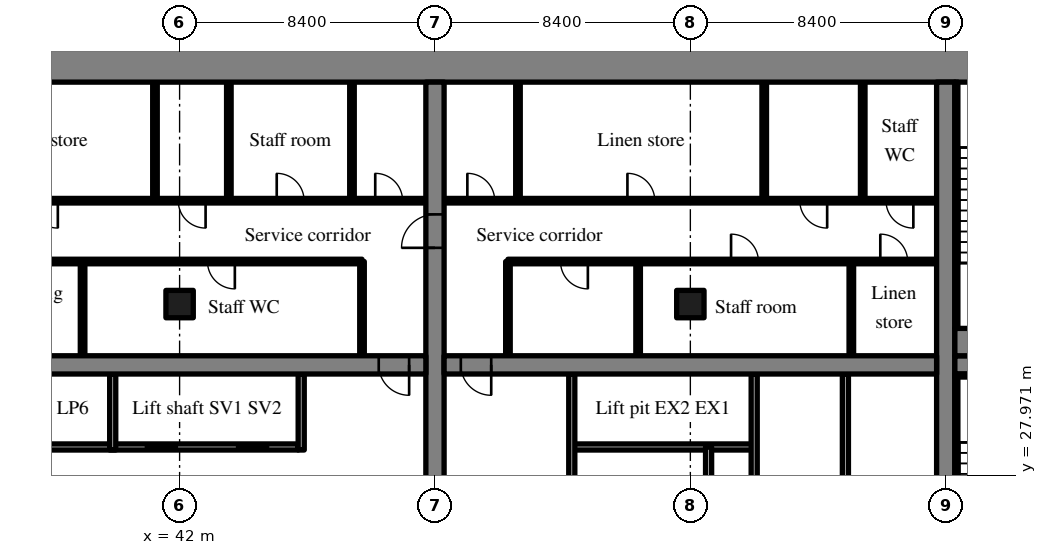
"""IFC4 building model, lengths in metres.
Left out: names, types, materials, properties, quantities, classifications, styles, units other than length and angle.
Written with IfcOpenShell. Run it as: python <this file> out.ifc"""

import sys

from ifc_helpers import new_model, si_unit, direction, frame, frame_2d, origin, origin_2d, place, context, subcontext, project, spatial, rectangle, extrude, source, transform, mapped, element, fill, save


model = new_model("IFC4")
c1 = context("Model", 3, precision=1e-05, world=origin(), true_north=direction((0.0, 1.0)))
c2 = subcontext(c1, "Body", "Model", "MODEL_VIEW")
j1 = project(units=[si_unit("LENGTHUNIT", "METRE"), si_unit("PLANEANGLEUNIT", "RADIAN")], contexts=[c1])
p1 = place(None, origin())
s1 = spatial("IfcSite", under=j1, at=p1, CompositionType="ELEMENT")
p2 = place(p1, origin())
s2 = spatial("IfcBuilding", under=s1, at=p2, CompositionType="ELEMENT")
p3 = place(p2, frame((0.0, 0.0, -4.5)))
s3 = spatial("IfcBuildingStorey", under=s2, at=p3, CompositionType="ELEMENT", Elevation=-4.5)
m1 = source(origin(), c2, "Body", "SweptSolid", [
    extrude(rectangle(XDim=50.4, YDim=1.1, at=frame_2d((25.2, 0.0))), origin(), (0.0, 0.0, 1.0), 4.22),
])
p4 = place(p3, frame((25.2, 41.45, 0.0), z_axis=(0.0, 0.0, 1.0), x_axis=(1.0, 0.0, 0.0)))
e1 = element("IfcWall", 1, at=p4, inside=s3, PredefinedType="SHEAR", context=c2, shape_type="MappedRepresentation", body=[
    mapped(m1, transform((0.0, 0.0, 0.0), scale=1.0)),
])
m2 = source(origin(), c2, "Body", "SweptSolid", [
    extrude(rectangle(XDim=17.8, YDim=0.6, at=frame_2d((8.9, 0.0))), origin(), (0.0, 0.0, 1.0), 4.22),
])
p5 = place(p3, frame((50.4, 23.1, 0.0), z_axis=(0.0, 0.0, 1.0), x_axis=(0.0, 1.0, 0.0)))
e2 = element("IfcWall", 2, at=p5, inside=s3, PredefinedType="SHEAR", context=c2, shape_type="MappedRepresentation", body=[
    mapped(m2, transform((0.0, 0.0, 0.0), scale=1.0)),
])
m3 = source(origin(), c2, "Body", "SweptSolid", [
    extrude(rectangle(XDim=1.1, YDim=2.1, at=frame_2d((0.55, 1.05))), frame((0.0, 0.31, 0.0), z_axis=(0.0, -1.0, 0.0), x_axis=(1.0, 0.0, 0.0)), (0.0, 0.0, 1.0), 0.62),
])
p6 = place(p5, frame((12.35, 0.0, 0.0)))
e3 = element("IfcOpeningElement", 3, at=p6, cuts=e2, PredefinedType="OPENING", context=c2, shape_type="MappedRepresentation", body=[
    mapped(m3, transform((0.0, 0.0, 0.0), scale=1.0)),
])
p7 = place(p3, frame((67.2, 23.1, 0.0), z_axis=(0.0, 0.0, 1.0), x_axis=(0.0, 1.0, 0.0)))
e4 = element("IfcWall", 4, at=p7, inside=s3, PredefinedType="SHEAR", context=c2, shape_type="MappedRepresentation", body=[
    mapped(m2, transform((0.0, 0.0, 0.0), scale=1.0)),
])
m4 = source(origin(), c2, "Body", "SweptSolid", [
    extrude(rectangle(XDim=16.2, YDim=0.6, at=frame_2d((8.1, 0.0))), origin(), (0.0, 0.0, 1.0), 4.22),
])
p8 = place(p3, frame((33.9, 31.6, 0.0), z_axis=(0.0, 0.0, 1.0), x_axis=(1.0, 0.0, 0.0)))
e5 = element("IfcWall", 5, at=p8, inside=s3, PredefinedType="SHEAR", context=c2, shape_type="MappedRepresentation", body=[
    mapped(m4, transform((0.0, 0.0, 0.0), scale=1.0)),
])
m5 = source(origin(), c2, "Body", "SweptSolid", [
    extrude(rectangle(XDim=1.0, YDim=2.1, at=frame_2d((0.5, 1.05))), frame((0.0, 0.31, 0.0), z_axis=(0.0, -1.0, 0.0), x_axis=(1.0, 0.0, 0.0)), (0.0, 0.0, 1.0), 0.62),
])
p9 = place(p8, frame((14.65, 0.0, 0.0)))
e6 = element("IfcOpeningElement", 6, at=p9, cuts=e5, PredefinedType="OPENING", context=c2, shape_type="MappedRepresentation", body=[
    mapped(m5, transform((0.0, 0.0, 0.0), scale=1.0)),
])
m6 = source(origin(), c2, "Body", "SweptSolid", [
    extrude(rectangle(XDim=16.2, YDim=0.6, at=frame_2d((8.1, 0.0))), origin(), (0.0, 0.0, 1.0), 4.22),
])
p10 = place(p3, frame((50.7, 31.6, 0.0), z_axis=(0.0, 0.0, 1.0), x_axis=(1.0, 0.0, 0.0)))
e7 = element("IfcWall", 7, at=p10, inside=s3, PredefinedType="SHEAR", context=c2, shape_type="MappedRepresentation", body=[
    mapped(m6, transform((0.0, 0.0, 0.0), scale=1.0)),
])
p11 = place(p10, frame((0.55, 0.0, 0.0)))
e8 = element("IfcOpeningElement", 8, at=p11, cuts=e7, PredefinedType="OPENING", context=c2, shape_type="MappedRepresentation", body=[
    mapped(m5, transform((0.0, 0.0, 0.0), scale=1.0)),
])
m7 = source(origin(), c2, "Body", "SweptSolid", [
    extrude(rectangle(XDim=7.0, YDim=0.6, at=frame_2d((3.5, 0.0))), origin(), (0.0, 0.0, 1.0), 4.22),
])
p12 = place(p3, frame((67.5, 31.6, 0.0), z_axis=(0.0, 0.0, 1.0), x_axis=(1.0, 0.0, 0.0)))
e9 = element("IfcWall", 9, at=p12, inside=s3, PredefinedType="SHEAR", context=c2, shape_type="MappedRepresentation", body=[
    mapped(m7, transform((0.0, 0.0, 0.0), scale=1.0)),
])
p13 = place(p12, frame((5.425, 0.0, 0.0)))
e10 = element("IfcOpeningElement", 10, at=p13, cuts=e9, PredefinedType="OPENING", context=c2, shape_type="MappedRepresentation", body=[
    mapped(m3, transform((0.0, 0.0, 0.0), scale=1.0)),
])
m8 = source(origin(), c2, "Body", "SweptSolid", [
    extrude(rectangle(XDim=0.9, YDim=0.9, at=origin_2d()), origin(), (0.0, 0.0, 1.0), 4.22),
])
for number, where, z_axis, x_axis in (
    (11, (42.0, 33.6, 0.0), (0.0, 0.0, 1.0), (1.0, 0.0, 0.0)),
    (12, (58.8, 33.6, 0.0), (0.0, 0.0, 1.0), (1.0, 0.0, 0.0)),
):
    element("IfcColumn", number, at=place(p3, frame(where, z_axis=z_axis, x_axis=x_axis)), inside=s3, PredefinedType="COLUMN", context=c2, shape_type="MappedRepresentation", body=[
        mapped(m8, transform((0.0, 0.0, 0.0), scale=1.0)),
    ])
m9 = source(origin(), c2, "Body", "SweptSolid", [
    extrude(rectangle(XDim=12.0, YDim=0.2, at=frame_2d((6.0, 0.0))), origin(), (0.0, 0.0, 1.0), 4.22),
])
p14 = place(p3, frame((33.9, 28.9, 0.0), z_axis=(0.0, 0.0, 1.0), x_axis=(1.0, 0.0, 0.0)))
e13 = element("IfcWall", 13, at=p14, inside=s3, PredefinedType="SOLIDWALL", context=c2, shape_type="MappedRepresentation", body=[
    mapped(m9, transform((0.0, 0.0, 0.0), scale=1.0)),
])
m10 = source(origin(), c2, "Body", "SweptSolid", [
    extrude(rectangle(XDim=1.1, YDim=2.1, at=frame_2d((0.55, 1.05))), frame((0.0, 0.11, 0.0), z_axis=(0.0, -1.0, 0.0), x_axis=(1.0, 0.0, 0.0)), (0.0, 0.0, 1.0), 0.22),
])
p15 = place(p14, frame((6.95, 0.0, 0.0)))
e14 = element("IfcOpeningElement", 14, at=p15, cuts=e13, PredefinedType="OPENING", context=c2, shape_type="MappedRepresentation", body=[
    mapped(m10, transform((0.0, 0.0, 0.0), scale=1.0)),
])
p16 = place(p14, frame((9.95, 0.0, 0.0)))
e15 = element("IfcOpeningElement", 15, at=p16, cuts=e13, PredefinedType="OPENING", context=c2, shape_type="MappedRepresentation", body=[
    mapped(m10, transform((0.0, 0.0, 0.0), scale=1.0)),
])
m11 = source(origin(), c2, "Body", "SweptSolid", [
    extrude(rectangle(XDim=2.5, YDim=0.2, at=frame_2d((1.25, 0.0))), origin(), (0.0, 0.0, 1.0), 4.22),
])
for number, where, z_axis, x_axis in (
    (16, (46.0, 28.8, 0.0), (0.0, 0.0, 1.0), (0.0, 1.0, 0.0)),
    (17, (39.8, 28.8, 0.0), (0.0, 0.0, 1.0), (0.0, 1.0, 0.0)),
):
    element("IfcWall", number, at=place(p3, frame(where, z_axis=z_axis, x_axis=x_axis)), inside=s3, PredefinedType="SOLIDWALL", context=c2, shape_type="MappedRepresentation", body=[
        mapped(m11, transform((0.0, 0.0, 0.0), scale=1.0)),
    ])
m12 = source(origin(), c2, "Body", "SweptSolid", [
    extrude(rectangle(XDim=3.1, YDim=0.15, at=frame_2d((1.55, 0.0))), origin(), (0.0, 0.0, 1.0), 4.22),
])
p17 = place(p3, frame((48.0, 31.9, 0.0), z_axis=(0.0, 0.0, 1.0), x_axis=(0.0, 1.0, 0.0)))
e18 = element("IfcWall", 18, at=p17, inside=s3, PredefinedType="PARTITIONING", context=c2, shape_type="MappedRepresentation", body=[
    mapped(m12, transform((0.0, 0.0, 0.0), scale=1.0)),
])
m13 = source(origin(), c2, "Body", "SweptSolid", [
    extrude(rectangle(XDim=14.1, YDim=0.15, at=frame_2d((7.05, 0.0))), origin(), (0.0, 0.0, 1.0), 4.22),
])
p18 = place(p3, frame((33.9, 35.0, 0.0), z_axis=(0.0, 0.0, 1.0), x_axis=(1.0, 0.0, 0.0)))
e19 = element("IfcWall", 19, at=p18, inside=s3, PredefinedType="PARTITIONING", context=c2, shape_type="MappedRepresentation", body=[
    mapped(m13, transform((0.0, 0.0, 0.0), scale=1.0)),
])
m14 = source(origin(), c2, "Body", "SweptSolid", [
    extrude(rectangle(XDim=0.9, YDim=2.1, at=frame_2d((0.45, 1.05))), frame((0.0, 0.085, 0.0), z_axis=(0.0, -1.0, 0.0), x_axis=(1.0, 0.0, 0.0)), (0.0, 0.0, 1.0), 0.17),
])
p19 = place(p18, frame((2.004, 0.0, 0.0)))
e20 = element("IfcOpeningElement", 20, at=p19, cuts=e19, PredefinedType="OPENING", context=c2, shape_type="MappedRepresentation", body=[
    mapped(m14, transform((0.0, 0.0, 0.0), scale=1.0)),
])
p20 = place(p18, frame((9.017, 0.0, 0.0)))
e21 = element("IfcOpeningElement", 21, at=p20, cuts=e19, PredefinedType="OPENING", context=c2, shape_type="MappedRepresentation", body=[
    mapped(m14, transform((0.0, 0.0, 0.0), scale=1.0)),
])
m15 = source(origin(), c2, "Body", "SweptSolid", [
    extrude(rectangle(XDim=16.2, YDim=0.15, at=frame_2d((8.1, 0.0))), origin(), (0.0, 0.0, 1.0), 4.22),
])
p21 = place(p3, frame((33.9, 37.0, 0.0), z_axis=(0.0, 0.0, 1.0), x_axis=(1.0, 0.0, 0.0)))
e22 = element("IfcWall", 22, at=p21, inside=s3, PredefinedType="PARTITIONING", context=c2, shape_type="MappedRepresentation", body=[
    mapped(m15, transform((0.0, 0.0, 0.0), scale=1.0)),
])
p22 = place(p21, frame((3.195, 0.0, 0.0)))
e23 = element("IfcOpeningElement", 23, at=p22, cuts=e22, PredefinedType="OPENING", context=c2, shape_type="MappedRepresentation", body=[
    mapped(m14, transform((0.0, 0.0, 0.0), scale=1.0)),
])
p23 = place(p21, frame((8.055, 0.0, 0.0)))
e24 = element("IfcOpeningElement", 24, at=p23, cuts=e22, PredefinedType="OPENING", context=c2, shape_type="MappedRepresentation", body=[
    mapped(m14, transform((0.0, 0.0, 0.0), scale=1.0)),
])
p24 = place(p21, frame((11.295, 0.0, 0.0)))
e25 = element("IfcOpeningElement", 25, at=p24, cuts=e22, PredefinedType="OPENING", context=c2, shape_type="MappedRepresentation", body=[
    mapped(m14, transform((0.0, 0.0, 0.0), scale=1.0)),
])
p25 = place(p21, frame((14.535, 0.0, 0.0)))
e26 = element("IfcOpeningElement", 26, at=p25, cuts=e22, PredefinedType="OPENING", context=c2, shape_type="MappedRepresentation", body=[
    mapped(m14, transform((0.0, 0.0, 0.0), scale=1.0)),
])
p26 = place(p3, frame((38.809, 31.9, 0.0), z_axis=(0.0, 0.0, 1.0), x_axis=(0.0, 1.0, 0.0)))
e27 = element("IfcWall", 27, at=p26, inside=s3, PredefinedType="PARTITIONING", context=c2, shape_type="MappedRepresentation", body=[
    mapped(m12, transform((0.0, 0.0, 0.0), scale=1.0)),
])
m16 = source(origin(), c2, "Body", "SweptSolid", [
    extrude(rectangle(XDim=3.9, YDim=0.15, at=frame_2d((1.95, 0.0))), origin(), (0.0, 0.0, 1.0), 4.22),
])
for number, where, z_axis, x_axis in (
    (28, (41.19, 37.0, 0.0), (0.0, 0.0, 1.0), (0.0, 1.0, 0.0)),
    (29, (43.62, 37.0, 0.0), (0.0, 0.0, 1.0), (0.0, 1.0, 0.0)),
    (30, (47.67, 37.0, 0.0), (0.0, 0.0, 1.0), (0.0, 1.0, 0.0)),
):
    element("IfcWall", number, at=place(p3, frame(where, z_axis=z_axis, x_axis=x_axis)), inside=s3, PredefinedType="PARTITIONING", context=c2, shape_type="MappedRepresentation", body=[
        mapped(m16, transform((0.0, 0.0, 0.0), scale=1.0)),
    ])
m17 = source(origin(), c2, "Body", "SweptSolid", [
    extrude(rectangle(XDim=6.0, YDim=0.2, at=frame_2d((3.0, 0.0))), origin(), (0.0, 0.0, 1.0), 4.22),
])
p27 = place(p3, frame((60.9, 28.9, 0.0), z_axis=(0.0, 0.0, 1.0), x_axis=(-1.0, 0.0, 0.0)))
e31 = element("IfcWall", 31, at=p27, inside=s3, PredefinedType="SOLIDWALL", context=c2, shape_type="MappedRepresentation", body=[
    mapped(m17, transform((0.0, 0.0, 0.0), scale=1.0)),
])
m18 = source(origin(), c2, "Body", "SweptSolid", [
    extrude(rectangle(XDim=8.2, YDim=0.2, at=frame_2d((4.1, 0.0))), origin(), (0.0, 0.0, 1.0), 4.22),
])
for number, where, z_axis, x_axis in (
    (32, (54.9, 23.1, 0.0), (0.0, 0.0, 1.0), (0.0, 1.0, 0.0)),
    (33, (60.9, 23.1, 0.0), (0.0, 0.0, 1.0), (0.0, 1.0, 0.0)),
):
    element("IfcWall", number, at=place(p3, frame(where, z_axis=z_axis, x_axis=x_axis)), inside=s3, PredefinedType="PARTITIONING", context=c2, shape_type="MappedRepresentation", body=[
        mapped(m18, transform((0.0, 0.0, 0.0), scale=1.0)),
    ])
m19 = source(origin(), c2, "Body", "SweptSolid", [
    extrude(rectangle(XDim=5.8, YDim=0.2, at=frame_2d((2.9, 0.0))), origin(), (0.0, 0.0, 1.0), 4.22),
])
p28 = place(p3, frame((59.4, 23.1, 0.0), z_axis=(0.0, 0.0, 1.0), x_axis=(0.0, 1.0, 0.0)))
e34 = element("IfcWall", 34, at=p28, inside=s3, PredefinedType="PARTITIONING", context=c2, shape_type="MappedRepresentation", body=[
    mapped(m19, transform((0.0, 0.0, 0.0), scale=1.0)),
])
p29 = place(p3, frame((63.9, 23.1, 0.0), z_axis=(0.0, 0.0, 1.0), x_axis=(0.0, 1.0, 0.0)))
e35 = element("IfcWall", 35, at=p29, inside=s3, PredefinedType="PARTITIONING", context=c2, shape_type="MappedRepresentation", body=[
    mapped(m18, transform((0.0, 0.0, 0.0), scale=1.0)),
])
p30 = place(p3, frame((52.8, 31.9, 0.0), z_axis=(0.0, 0.0, 1.0), x_axis=(0.0, 1.0, 0.0)))
e36 = element("IfcWall", 36, at=p30, inside=s3, PredefinedType="PARTITIONING", context=c2, shape_type="MappedRepresentation", body=[
    mapped(m12, transform((0.0, 0.0, 0.0), scale=1.0)),
])
m20 = source(origin(), c2, "Body", "SweptSolid", [
    extrude(rectangle(XDim=14.1, YDim=0.15, at=frame_2d((7.05, 0.0))), origin(), (0.0, 0.0, 1.0), 4.22),
])
p31 = place(p3, frame((66.9, 35.0, 0.0), z_axis=(0.0, 0.0, 1.0), x_axis=(-1.0, 0.0, 0.0)))
e37 = element("IfcWall", 37, at=p31, inside=s3, PredefinedType="PARTITIONING", context=c2, shape_type="MappedRepresentation", body=[
    mapped(m20, transform((0.0, 0.0, 0.0), scale=1.0)),
])
p32 = place(p31, frame((0.952, 0.0, 0.0)))
e38 = element("IfcOpeningElement", 38, at=p32, cuts=e37, PredefinedType="OPENING", context=c2, shape_type="MappedRepresentation", body=[
    mapped(m14, transform((0.0, 0.0, 0.0), scale=1.0)),
])
p33 = place(p31, frame((5.861, 0.0, 0.0)))
e39 = element("IfcOpeningElement", 39, at=p33, cuts=e37, PredefinedType="OPENING", context=c2, shape_type="MappedRepresentation", body=[
    mapped(m14, transform((0.0, 0.0, 0.0), scale=1.0)),
])
p34 = place(p31, frame((11.471, 0.0, 0.0)))
e40 = element("IfcOpeningElement", 40, at=p34, cuts=e37, PredefinedType="OPENING", context=c2, shape_type="MappedRepresentation", body=[
    mapped(m14, transform((0.0, 0.0, 0.0), scale=1.0)),
])
m21 = source(origin(), c2, "Body", "SweptSolid", [
    extrude(rectangle(XDim=16.2, YDim=0.15, at=frame_2d((8.1, 0.0))), origin(), (0.0, 0.0, 1.0), 4.22),
])
p35 = place(p3, frame((66.9, 37.0, 0.0), z_axis=(0.0, 0.0, 1.0), x_axis=(-1.0, 0.0, 0.0)))
e41 = element("IfcWall", 41, at=p35, inside=s3, PredefinedType="PARTITIONING", context=c2, shape_type="MappedRepresentation", body=[
    mapped(m21, transform((0.0, 0.0, 0.0), scale=1.0)),
])
p36 = place(p35, frame((0.765, 0.0, 0.0)))
e42 = element("IfcOpeningElement", 42, at=p36, cuts=e41, PredefinedType="OPENING", context=c2, shape_type="MappedRepresentation", body=[
    mapped(m14, transform((0.0, 0.0, 0.0), scale=1.0)),
])
p37 = place(p35, frame((3.6, 0.0, 0.0)))
e43 = element("IfcOpeningElement", 43, at=p37, cuts=e41, PredefinedType="OPENING", context=c2, shape_type="MappedRepresentation", body=[
    mapped(m14, transform((0.0, 0.0, 0.0), scale=1.0)),
])
p38 = place(p35, frame((9.27, 0.0, 0.0)))
e44 = element("IfcOpeningElement", 44, at=p38, cuts=e41, PredefinedType="OPENING", context=c2, shape_type="MappedRepresentation", body=[
    mapped(m14, transform((0.0, 0.0, 0.0), scale=1.0)),
])
p39 = place(p35, frame((14.535, 0.0, 0.0)))
e45 = element("IfcOpeningElement", 45, at=p39, cuts=e41, PredefinedType="OPENING", context=c2, shape_type="MappedRepresentation", body=[
    mapped(m14, transform((0.0, 0.0, 0.0), scale=1.0)),
])
for number, where, z_axis, x_axis in (
    (46, (64.095, 31.9, 0.0), (0.0, 0.0, 1.0), (0.0, 1.0, 0.0)),
    (47, (57.082, 31.9, 0.0), (0.0, 0.0, 1.0), (0.0, 1.0, 0.0)),
):
    element("IfcWall", number, at=place(p3, frame(where, z_axis=z_axis, x_axis=x_axis)), inside=s3, PredefinedType="PARTITIONING", context=c2, shape_type="MappedRepresentation", body=[
        mapped(m12, transform((0.0, 0.0, 0.0), scale=1.0)),
    ])
for number, where, z_axis, x_axis in (
    (48, (64.47, 37.0, 0.0), (0.0, 0.0, 1.0), (0.0, 1.0, 0.0)),
    (49, (61.23, 37.0, 0.0), (0.0, 0.0, 1.0), (0.0, 1.0, 0.0)),
    (50, (53.13, 37.0, 0.0), (0.0, 0.0, 1.0), (0.0, 1.0, 0.0)),
):
    element("IfcWall", number, at=place(p3, frame(where, z_axis=z_axis, x_axis=x_axis)), inside=s3, PredefinedType="PARTITIONING", context=c2, shape_type="MappedRepresentation", body=[
        mapped(m16, transform((0.0, 0.0, 0.0), scale=1.0)),
    ])
m22 = source(origin(), c2, "Body", "SweptSolid", [
    extrude(rectangle(XDim=4.75, YDim=0.1, at=frame_2d((2.375, 0.0))), origin(), (0.0, 0.0, 1.0), 4.22),
])
p40 = place(p3, frame((67.5, 31.25, 0.0), z_axis=(0.0, 0.0, 1.0), x_axis=(1.0, 0.0, 0.0)))
e51 = element("IfcWall", 51, at=p40, inside=s3, PredefinedType="SOLIDWALL", context=c2, shape_type="MappedRepresentation", body=[
    mapped(m22, transform((0.0, 0.0, 0.0), scale=1.0)),
])
m23 = source(origin(), c2, "Body", "SweptSolid", [
    extrude(rectangle(XDim=8.1, YDim=0.1, at=frame_2d((4.05, 0.0))), origin(), (0.0, 0.0, 1.0), 4.22),
])
p41 = place(p3, frame((67.55, 23.1, 0.0), z_axis=(0.0, 0.0, 1.0), x_axis=(0.0, 1.0, 0.0)))
e52 = element("IfcWall", 52, at=p41, inside=s3, PredefinedType="SOLIDWALL", context=c2, shape_type="MappedRepresentation", body=[
    mapped(m23, transform((0.0, 0.0, 0.0), scale=1.0)),
])
m24 = source(origin(), c2, "Body", "SweptSolid", [
    extrude(rectangle(XDim=4.75, YDim=0.9, at=frame_2d((2.375, 0.0))), origin(), (0.0, 0.0, 1.0), 4.22),
])
p42 = place(p3, frame((67.5, 32.35, 0.0), z_axis=(0.0, 0.0, 1.0), x_axis=(1.0, 0.0, 0.0)))
e53 = element("IfcWall", 53, at=p42, inside=s3, PredefinedType="SOLIDWALL", context=c2, shape_type="MappedRepresentation", body=[
    mapped(m24, transform((0.0, 0.0, 0.0), scale=1.0)),
])
p43 = place(p3, frame((67.55, 32.8, 0.0), z_axis=(0.0, 0.0, 1.0), x_axis=(0.0, 1.0, 0.0)))
e54 = element("IfcWall", 54, at=p43, inside=s3, PredefinedType="SOLIDWALL", context=c2, shape_type="MappedRepresentation", body=[
    mapped(m23, transform((0.0, 0.0, 0.0), scale=1.0)),
])
m25 = source(origin(), c2, "Body", "SweptSolid", [
    extrude(rectangle(XDim=1.0, YDim=2.1, at=frame_2d((0.5, 1.05))), frame((0.0, 0.025, 0.0), z_axis=(0.0, -1.0, 0.0), x_axis=(1.0, 0.0, 0.0)), (0.0, 0.0, 1.0), 0.05),
])
p44 = place(p9, origin())
e55 = element("IfcDoor", 55, at=p44, inside=s3, OperationType="SINGLE_SWING_RIGHT", PredefinedType="DOOR", context=c2, shape_type="MappedRepresentation", body=[
    mapped(m25, transform((0.0, 0.0, 0.0), scale=1.0)),
])
fill(e6, e55)
m26 = source(origin(), c2, "Body", "SweptSolid", [
    extrude(rectangle(XDim=1.1, YDim=2.1, at=frame_2d((0.55, 1.05))), frame((0.0, 0.025, 0.0), z_axis=(0.0, -1.0, 0.0), x_axis=(1.0, 0.0, 0.0)), (0.0, 0.0, 1.0), 0.05),
])
p45 = place(p15, origin())
e56 = element("IfcDoor", 56, at=p45, inside=s3, OperationType="SLIDING_TO_LEFT", PredefinedType="DOOR", context=c2, shape_type="MappedRepresentation", body=[
    mapped(m26, transform((0.0, 0.0, 0.0), scale=1.0)),
])
fill(e14, e56)
p46 = place(p16, origin())
e57 = element("IfcDoor", 57, at=p46, inside=s3, OperationType="SLIDING_TO_RIGHT", PredefinedType="DOOR", context=c2, shape_type="MappedRepresentation", body=[
    mapped(m26, transform((0.0, 0.0, 0.0), scale=1.0)),
])
fill(e15, e57)
m27 = source(origin(), c2, "Body", "SweptSolid", [
    extrude(rectangle(XDim=0.9, YDim=2.1, at=frame_2d((0.45, 1.05))), frame((0.0, 0.025, 0.0), z_axis=(0.0, -1.0, 0.0), x_axis=(1.0, 0.0, 0.0)), (0.0, 0.0, 1.0), 0.05),
])
p47 = place(p20, origin())
e58 = element("IfcDoor", 58, at=p47, inside=s3, OperationType="SINGLE_SWING_RIGHT", PredefinedType="DOOR", context=c2, shape_type="MappedRepresentation", body=[
    mapped(m27, transform((0.0, 0.0, 0.0), scale=1.0)),
])
fill(e21, e58)
p48 = place(p22, origin())
e59 = element("IfcDoor", 59, at=p48, inside=s3, OperationType="SINGLE_SWING_RIGHT", PredefinedType="DOOR", context=c2, shape_type="MappedRepresentation", body=[
    mapped(m27, transform((0.0, 0.0, 0.0), scale=1.0)),
])
fill(e23, e59)
p49 = place(p23, origin())
e60 = element("IfcDoor", 60, at=p49, inside=s3, OperationType="SINGLE_SWING_RIGHT", PredefinedType="DOOR", context=c2, shape_type="MappedRepresentation", body=[
    mapped(m27, transform((0.0, 0.0, 0.0), scale=1.0)),
])
fill(e24, e60)
p50 = place(p24, origin())
e61 = element("IfcDoor", 61, at=p50, inside=s3, OperationType="SINGLE_SWING_LEFT", PredefinedType="DOOR", context=c2, shape_type="MappedRepresentation", body=[
    mapped(m27, transform((0.0, 0.0, 0.0), scale=1.0)),
])
fill(e25, e61)
p51 = place(p25, origin())
e62 = element("IfcDoor", 62, at=p51, inside=s3, OperationType="SINGLE_SWING_LEFT", PredefinedType="DOOR", context=c2, shape_type="MappedRepresentation", body=[
    mapped(m27, transform((0.0, 0.0, 0.0), scale=1.0)),
])
fill(e26, e62)
p52 = place(p11, origin())
e63 = element("IfcDoor", 63, at=p52, inside=s3, OperationType="SINGLE_SWING_RIGHT", PredefinedType="DOOR", context=c2, shape_type="MappedRepresentation", body=[
    mapped(m25, transform((0.0, 0.0, 0.0), scale=1.0)),
])
fill(e8, e63)
p53 = place(p32, origin())
e64 = element("IfcDoor", 64, at=p53, inside=s3, OperationType="SINGLE_SWING_RIGHT", PredefinedType="DOOR", context=c2, shape_type="MappedRepresentation", body=[
    mapped(m27, transform((0.0, 0.0, 0.0), scale=1.0)),
])
fill(e38, e64)
p54 = place(p33, origin())
e65 = element("IfcDoor", 65, at=p54, inside=s3, OperationType="SINGLE_SWING_RIGHT", PredefinedType="DOOR", context=c2, shape_type="MappedRepresentation", body=[
    mapped(m27, transform((0.0, 0.0, 0.0), scale=1.0)),
])
fill(e39, e65)
p55 = place(p34, origin())
e66 = element("IfcDoor", 66, at=p55, inside=s3, OperationType="SINGLE_SWING_LEFT", PredefinedType="DOOR", context=c2, shape_type="MappedRepresentation", body=[
    mapped(m27, transform((0.0, 0.0, 0.0), scale=1.0)),
])
fill(e40, e66)
p56 = place(p36, origin())
e67 = element("IfcDoor", 67, at=p56, inside=s3, OperationType="SINGLE_SWING_LEFT", PredefinedType="DOOR", context=c2, shape_type="MappedRepresentation", body=[
    mapped(m27, transform((0.0, 0.0, 0.0), scale=1.0)),
])
fill(e42, e67)
p57 = place(p37, origin())
e68 = element("IfcDoor", 68, at=p57, inside=s3, OperationType="SINGLE_SWING_LEFT", PredefinedType="DOOR", context=c2, shape_type="MappedRepresentation", body=[
    mapped(m27, transform((0.0, 0.0, 0.0), scale=1.0)),
])
fill(e43, e68)
p58 = place(p38, origin())
e69 = element("IfcDoor", 69, at=p58, inside=s3, OperationType="SINGLE_SWING_RIGHT", PredefinedType="DOOR", context=c2, shape_type="MappedRepresentation", body=[
    mapped(m27, transform((0.0, 0.0, 0.0), scale=1.0)),
])
fill(e44, e69)
p59 = place(p39, origin())
e70 = element("IfcDoor", 70, at=p59, inside=s3, OperationType="SINGLE_SWING_RIGHT", PredefinedType="DOOR", context=c2, shape_type="MappedRepresentation", body=[
    mapped(m27, transform((0.0, 0.0, 0.0), scale=1.0)),
])
fill(e45, e70)
p60 = place(p6, origin())
e71 = element("IfcDoor", 71, at=p60, inside=s3, OperationType="SINGLE_SWING_LEFT", PredefinedType="DOOR", context=c2, shape_type="MappedRepresentation", body=[
    mapped(m26, transform((0.0, 0.0, 0.0), scale=1.0)),
])
fill(e3, e71)
save(model, sys.argv[1])
